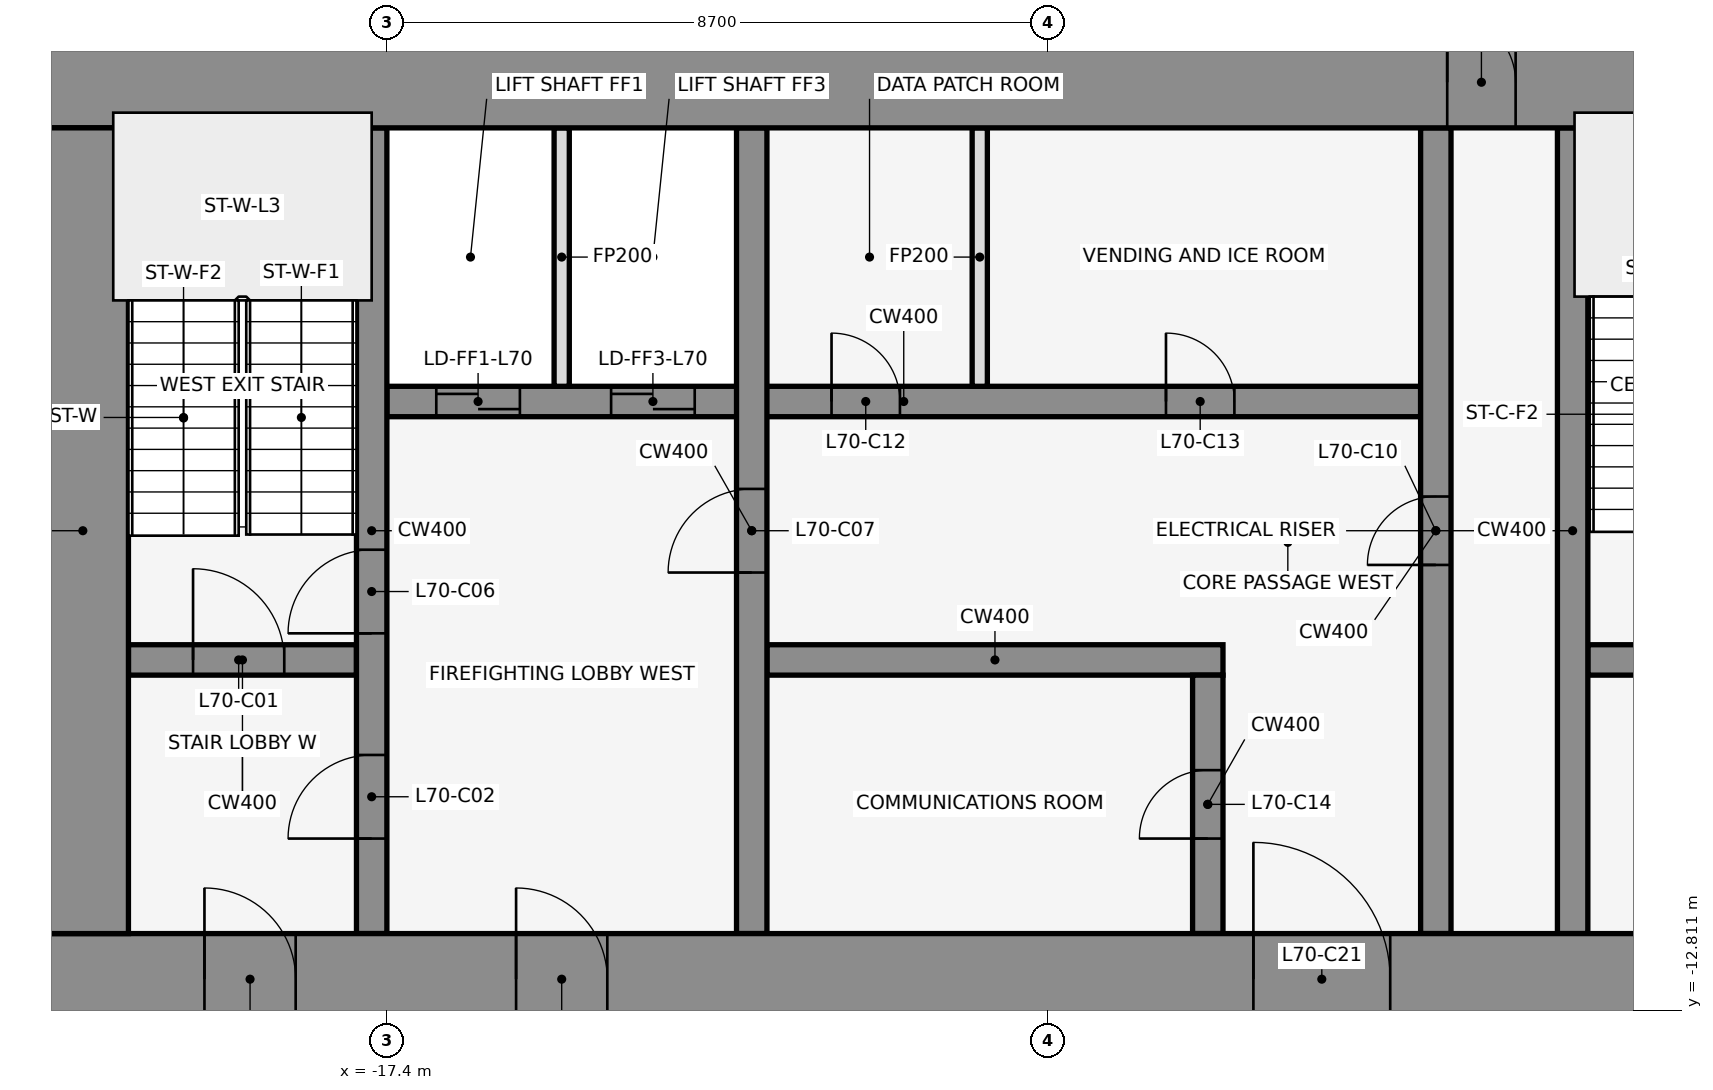
"""IFC4 building model, lengths in metres.
Left out: names, types, materials, properties, quantities, classifications, styles, units other than length and angle.
Written with IfcOpenShell. Run it as: python <this file> out.ifc"""

import sys

from ifc_helpers import new_model, si_unit, direction, frame, frame_2d, origin, place, context, subcontext, project, spatial, rectangle, extrude, element, fill, save


model = new_model("IFC4")
c1 = context("Model", 3, precision=1e-05, world=origin(), true_north=direction((0.0, 1.0)))
c2 = subcontext(c1, "Body", "Model", "MODEL_VIEW")
j1 = project(units=[si_unit("LENGTHUNIT", "METRE"), si_unit("PLANEANGLEUNIT", "RADIAN")], contexts=[c1])
p1 = place(None, origin())
s1 = spatial("IfcSite", under=j1, at=p1, CompositionType="ELEMENT")
p2 = place(p1, origin())
s2 = spatial("IfcBuilding", under=s1, at=p2, CompositionType="ELEMENT")
p3 = place(p2, frame((0.0, 0.0, 311.0)))
s3 = spatial("IfcBuildingStorey", under=s2, at=p3, CompositionType="ELEMENT", Elevation=311.0)
for number, where, z_axis, x_axis in (
    (1, (-0.068, -0.105, 0.0), (0.0, 0.0, 1.0), (-0.84, 0.543, 0.0)),
    (2, (-14.599, 1.08, 0.0), (0.0, 0.0, 1.0), (-0.84, -0.543, 0.0)),
):
    element("IfcWall", number, at=place(p3, frame(where, z_axis=z_axis, x_axis=x_axis)), inside=s3, PredefinedType="STANDARD", context=c2, shape_type="SweptSolid", body=[
        extrude(rectangle(XDim=2.183, YDim=0.25, at=frame_2d((1.091, 0.0))), origin(), (0.0, 0.0, 1.0), 4.35),
    ])
p4 = place(p3, frame((-20.8, -8.2, 0.0), z_axis=(0.0, 0.0, 1.0), x_axis=(1.0, 0.0, 0.0)))
e3 = element("IfcWall", 3, at=p4, inside=s3, PredefinedType="SHEAR", context=c2, shape_type="SweptSolid", body=[
    extrude(rectangle(XDim=3.0, YDim=0.4, at=frame_2d((1.5, 0.0))), origin(), (0.0, 0.0, 1.0), 4.5),
])
p5 = place(p4, frame((0.85, 0.0, 0.0)))
e4 = element("IfcOpeningElement", 4, at=p5, cuts=e3, PredefinedType="OPENING", context=c2, shape_type="SweptSolid", body=[
    extrude(rectangle(XDim=1.2, YDim=2.1, at=frame_2d((0.6, 1.05))), frame((0.0, 0.212, 0.0), z_axis=(0.0, -1.0, 0.0), x_axis=(1.0, 0.0, 0.0)), (0.0, 0.0, 1.0), 0.424),
])
p6 = place(p3, frame((-12.4, -8.2, 0.0), z_axis=(0.0, 0.0, 1.0), x_axis=(1.0, 0.0, 0.0)))
e5 = element("IfcWall", 5, at=p6, inside=s3, PredefinedType="SHEAR", context=c2, shape_type="SweptSolid", body=[
    extrude(rectangle(XDim=6.0, YDim=0.4, at=frame_2d((3.0, 0.0))), origin(), (0.0, 0.0, 1.0), 4.5),
])
p7 = place(p3, frame((-1.6, -8.2, 0.0), z_axis=(0.0, 0.0, 1.0), x_axis=(1.0, 0.0, 0.0)))
e6 = element("IfcWall", 6, at=p7, inside=s3, PredefinedType="SHEAR", context=c2, shape_type="SweptSolid", body=[
    extrude(rectangle(XDim=3.2, YDim=0.4, at=frame_2d((1.6, 0.0))), origin(), (0.0, 0.0, 1.0), 4.5),
])
p8 = place(p7, frame((1.05, 0.0, 0.0)))
e7 = element("IfcOpeningElement", 7, at=p8, cuts=e6, PredefinedType="OPENING", context=c2, shape_type="SweptSolid", body=[
    extrude(rectangle(XDim=1.2, YDim=2.1, at=frame_2d((0.6, 1.05))), frame((0.0, 0.212, 0.0), z_axis=(0.0, -1.0, 0.0), x_axis=(1.0, 0.0, 0.0)), (0.0, 0.0, 1.0), 0.424),
])
p9 = place(p3, frame((-17.4, -4.8, 0.0), z_axis=(0.0, 0.0, 1.0), x_axis=(1.0, 0.0, 0.0)))
e8 = element("IfcWall", 8, at=p9, inside=s3, PredefinedType="SHEAR", context=c2, shape_type="SweptSolid", body=[
    extrude(rectangle(XDim=13.6, YDim=0.4, at=frame_2d((6.8, 0.0))), origin(), (0.0, 0.0, 1.0), 4.5),
])
p10 = place(p9, frame((0.65, 0.0, 0.0)))
e9 = element("IfcOpeningElement", 9, at=p10, cuts=e8, PredefinedType="OPENING", context=c2, shape_type="SweptSolid", body=[
    extrude(rectangle(XDim=1.1, YDim=2.1, at=frame_2d((0.55, 1.05))), frame((0.0, 0.212, 0.0), z_axis=(0.0, -1.0, 0.0), x_axis=(1.0, 0.0, 0.0)), (0.0, 0.0, 1.0), 0.424),
])
p11 = place(p9, frame((2.95, 0.0, 0.0)))
e10 = element("IfcOpeningElement", 10, at=p11, cuts=e8, PredefinedType="OPENING", context=c2, shape_type="SweptSolid", body=[
    extrude(rectangle(XDim=1.1, YDim=2.1, at=frame_2d((0.55, 1.05))), frame((0.0, 0.212, 0.0), z_axis=(0.0, -1.0, 0.0), x_axis=(1.0, 0.0, 0.0)), (0.0, 0.0, 1.0), 0.424),
])
p12 = place(p9, frame((5.85, 0.0, 0.0)))
e11 = element("IfcOpeningElement", 11, at=p12, cuts=e8, PredefinedType="OPENING", context=c2, shape_type="SweptSolid", body=[
    extrude(rectangle(XDim=0.9, YDim=2.1, at=frame_2d((0.45, 1.05))), frame((0.0, 0.212, 0.0), z_axis=(0.0, -1.0, 0.0), x_axis=(1.0, 0.0, 0.0)), (0.0, 0.0, 1.0), 0.424),
])
p13 = place(p9, frame((10.25, 0.0, 0.0)))
e12 = element("IfcOpeningElement", 12, at=p13, cuts=e8, PredefinedType="OPENING", context=c2, shape_type="SweptSolid", body=[
    extrude(rectangle(XDim=0.9, YDim=2.1, at=frame_2d((0.45, 1.05))), frame((0.0, 0.212, 0.0), z_axis=(0.0, -1.0, 0.0), x_axis=(1.0, 0.0, 0.0)), (0.0, 0.0, 1.0), 0.424),
])
p14 = place(p3, frame((-17.6, -11.8, 0.0), z_axis=(0.0, 0.0, 1.0), x_axis=(0.0, 1.0, 0.0)))
e13 = element("IfcWall", 13, at=p14, inside=s3, PredefinedType="SHEAR", context=c2, shape_type="SweptSolid", body=[
    extrude(rectangle(XDim=10.6, YDim=0.4, at=frame_2d((5.3, 0.0))), origin(), (0.0, 0.0, 1.0), 4.5),
])
p15 = place(p14, frame((1.25, 0.0, 0.0)))
e14 = element("IfcOpeningElement", 14, at=p15, cuts=e13, PredefinedType="OPENING", context=c2, shape_type="SweptSolid", body=[
    extrude(rectangle(XDim=1.1, YDim=2.1, at=frame_2d((0.55, 1.05))), frame((0.0, 0.212, 0.0), z_axis=(0.0, -1.0, 0.0), x_axis=(1.0, 0.0, 0.0)), (0.0, 0.0, 1.0), 0.424),
])
p16 = place(p14, frame((3.95, 0.0, 0.0)))
e15 = element("IfcOpeningElement", 15, at=p16, cuts=e13, PredefinedType="OPENING", context=c2, shape_type="SweptSolid", body=[
    extrude(rectangle(XDim=1.1, YDim=2.1, at=frame_2d((0.55, 1.05))), frame((0.0, 0.212, 0.0), z_axis=(0.0, -1.0, 0.0), x_axis=(1.0, 0.0, 0.0)), (0.0, 0.0, 1.0), 0.424),
])
p17 = place(p3, frame((-15.1, -4.6, 0.0), z_axis=(0.0, 0.0, 1.0), x_axis=(0.0, 1.0, 0.0)))
e16 = element("IfcWall", 16, at=p17, inside=s3, PredefinedType="PARTITIONING", context=c2, shape_type="SweptSolid", body=[
    extrude(rectangle(XDim=3.4, YDim=0.2, at=frame_2d((1.7, 0.0))), origin(), (0.0, 0.0, 1.0), 3.418),
])
p18 = place(p3, frame((-12.6, -11.8, 0.0), z_axis=(0.0, 0.0, 1.0), x_axis=(0.0, 1.0, 0.0)))
e17 = element("IfcWall", 17, at=p18, inside=s3, PredefinedType="SHEAR", context=c2, shape_type="SweptSolid", body=[
    extrude(rectangle(XDim=10.6, YDim=0.4, at=frame_2d((5.3, 0.0))), origin(), (0.0, 0.0, 1.0), 4.5),
])
p19 = place(p18, frame((4.75, 0.0, 0.0)))
e18 = element("IfcOpeningElement", 18, at=p19, cuts=e17, PredefinedType="OPENING", context=c2, shape_type="SweptSolid", body=[
    extrude(rectangle(XDim=1.1, YDim=2.1, at=frame_2d((0.55, 1.05))), frame((0.0, 0.212, 0.0), z_axis=(0.0, -1.0, 0.0), x_axis=(1.0, 0.0, 0.0)), (0.0, 0.0, 1.0), 0.424),
])
p20 = place(p3, frame((-9.6, -4.6, 0.0), z_axis=(0.0, 0.0, 1.0), x_axis=(0.0, 1.0, 0.0)))
e19 = element("IfcWall", 19, at=p20, inside=s3, PredefinedType="PARTITIONING", context=c2, shape_type="SweptSolid", body=[
    extrude(rectangle(XDim=3.4, YDim=0.2, at=frame_2d((1.7, 0.0))), origin(), (0.0, 0.0, 1.0), 3.418),
])
p21 = place(p3, frame((-6.6, -11.8, 0.0), z_axis=(0.0, 0.0, 1.0), x_axis=(0.0, 1.0, 0.0)))
e20 = element("IfcWall", 20, at=p21, inside=s3, PredefinedType="SHEAR", context=c2, shape_type="SweptSolid", body=[
    extrude(rectangle(XDim=3.4, YDim=0.4, at=frame_2d((1.7, 0.0))), origin(), (0.0, 0.0, 1.0), 4.5),
])
p22 = place(p21, frame((1.25, 0.0, 0.0)))
e21 = element("IfcOpeningElement", 21, at=p22, cuts=e20, PredefinedType="OPENING", context=c2, shape_type="SweptSolid", body=[
    extrude(rectangle(XDim=0.9, YDim=2.1, at=frame_2d((0.45, 1.05))), frame((0.0, 0.212, 0.0), z_axis=(0.0, -1.0, 0.0), x_axis=(1.0, 0.0, 0.0)), (0.0, 0.0, 1.0), 0.424),
])
p23 = place(p3, frame((-3.6, -11.8, 0.0), z_axis=(0.0, 0.0, 1.0), x_axis=(0.0, 1.0, 0.0)))
e22 = element("IfcWall", 22, at=p23, inside=s3, PredefinedType="SHEAR", context=c2, shape_type="SweptSolid", body=[
    extrude(rectangle(XDim=10.6, YDim=0.4, at=frame_2d((5.3, 0.0))), origin(), (0.0, 0.0, 1.0), 4.5),
])
p24 = place(p23, frame((4.85, 0.0, 0.0)))
e23 = element("IfcOpeningElement", 23, at=p24, cuts=e22, PredefinedType="OPENING", context=c2, shape_type="SweptSolid", body=[
    extrude(rectangle(XDim=0.9, YDim=2.1, at=frame_2d((0.45, 1.05))), frame((0.0, 0.212, 0.0), z_axis=(0.0, -1.0, 0.0), x_axis=(1.0, 0.0, 0.0)), (0.0, 0.0, 1.0), 0.424),
])
p25 = place(p3, frame((-1.8, -11.8, 0.0), z_axis=(0.0, 0.0, 1.0), x_axis=(0.0, 1.0, 0.0)))
e24 = element("IfcWall", 24, at=p25, inside=s3, PredefinedType="SHEAR", context=c2, shape_type="SweptSolid", body=[
    extrude(rectangle(XDim=10.6, YDim=0.4, at=frame_2d((5.3, 0.0))), origin(), (0.0, 0.0, 1.0), 4.5),
])
p26 = place(p3, frame((-22.0, -0.6, 0.0), z_axis=(0.0, 0.0, 1.0), x_axis=(1.0, 0.0, 0.0)))
e25 = element("IfcWall", 25, at=p26, inside=s3, PredefinedType="SHEAR", context=c2, shape_type="SweptSolid", body=[
    extrude(rectangle(XDim=44.0, YDim=1.2, at=frame_2d((22.0, 0.0))), origin(), (0.0, 0.0, 1.0), 4.5),
])
p27 = place(p26, frame((18.55, 0.0, 0.0)))
e26 = element("IfcOpeningElement", 26, at=p27, cuts=e25, PredefinedType="OPENING", context=c2, shape_type="SweptSolid", body=[
    extrude(rectangle(XDim=0.9, YDim=2.1, at=frame_2d((0.45, 1.05))), frame((0.0, 0.612, 0.0), z_axis=(0.0, -1.0, 0.0), x_axis=(1.0, 0.0, 0.0)), (0.0, 0.0, 1.0), 1.224),
])
p28 = place(p26, frame((24.55, 0.0, 0.0)))
e27 = element("IfcOpeningElement", 27, at=p28, cuts=e25, PredefinedType="OPENING", context=c2, shape_type="SweptSolid", body=[
    extrude(rectangle(XDim=0.9, YDim=2.1, at=frame_2d((0.45, 1.05))), frame((0.0, 0.612, 0.0), z_axis=(0.0, -1.0, 0.0), x_axis=(1.0, 0.0, 0.0)), (0.0, 0.0, 1.0), 1.224),
])
p29 = place(p3, frame((-22.0, -12.4, 0.0), z_axis=(0.0, 0.0, 1.0), x_axis=(1.0, 0.0, 0.0)))
e28 = element("IfcWall", 28, at=p29, inside=s3, PredefinedType="SHEAR", context=c2, shape_type="SweptSolid", body=[
    extrude(rectangle(XDim=44.0, YDim=1.2, at=frame_2d((22.0, 0.0))), origin(), (0.0, 0.0, 1.0), 4.5),
])
p30 = place(p29, frame((2.2, 0.0, 0.0)))
e29 = element("IfcOpeningElement", 29, at=p30, cuts=e28, PredefinedType="OPENING", context=c2, shape_type="SweptSolid", body=[
    extrude(rectangle(XDim=1.2, YDim=2.1, at=frame_2d((0.6, 1.05))), frame((0.0, 0.612, 0.0), z_axis=(0.0, -1.0, 0.0), x_axis=(1.0, 0.0, 0.0)), (0.0, 0.0, 1.0), 1.224),
])
p31 = place(p29, frame((21.4, 0.0, 0.0)))
e30 = element("IfcOpeningElement", 30, at=p31, cuts=e28, PredefinedType="OPENING", context=c2, shape_type="SweptSolid", body=[
    extrude(rectangle(XDim=1.2, YDim=2.1, at=frame_2d((0.6, 1.05))), frame((0.0, 0.612, 0.0), z_axis=(0.0, -1.0, 0.0), x_axis=(1.0, 0.0, 0.0)), (0.0, 0.0, 1.0), 1.224),
])
p32 = place(p29, frame((40.6, 0.0, 0.0)))
e31 = element("IfcOpeningElement", 31, at=p32, cuts=e28, PredefinedType="OPENING", context=c2, shape_type="SweptSolid", body=[
    extrude(rectangle(XDim=1.2, YDim=2.1, at=frame_2d((0.6, 1.05))), frame((0.0, 0.612, 0.0), z_axis=(0.0, -1.0, 0.0), x_axis=(1.0, 0.0, 0.0)), (0.0, 0.0, 1.0), 1.224),
])
p33 = place(p29, frame((16.0, 0.0, 0.0)))
e32 = element("IfcOpeningElement", 32, at=p33, cuts=e28, PredefinedType="OPENING", context=c2, shape_type="SweptSolid", body=[
    extrude(rectangle(XDim=1.8, YDim=2.1, at=frame_2d((0.9, 1.05))), frame((0.0, 0.612, 0.0), z_axis=(0.0, -1.0, 0.0), x_axis=(1.0, 0.0, 0.0)), (0.0, 0.0, 1.0), 1.224),
])
p34 = place(p29, frame((6.3, 0.0, 0.0)))
e33 = element("IfcOpeningElement", 33, at=p34, cuts=e28, PredefinedType="OPENING", context=c2, shape_type="SweptSolid", body=[
    extrude(rectangle(XDim=1.2, YDim=2.1, at=frame_2d((0.6, 1.05))), frame((0.0, 0.612, 0.0), z_axis=(0.0, -1.0, 0.0), x_axis=(1.0, 0.0, 0.0)), (0.0, 0.0, 1.0), 1.224),
])
p35 = place(p29, frame((26.2, 0.0, 0.0)))
e34 = element("IfcOpeningElement", 34, at=p35, cuts=e28, PredefinedType="OPENING", context=c2, shape_type="SweptSolid", body=[
    extrude(rectangle(XDim=1.8, YDim=2.1, at=frame_2d((0.9, 1.05))), frame((0.0, 0.612, 0.0), z_axis=(0.0, -1.0, 0.0), x_axis=(1.0, 0.0, 0.0)), (0.0, 0.0, 1.0), 1.224),
])
p36 = place(p29, frame((36.5, 0.0, 0.0)))
e35 = element("IfcOpeningElement", 35, at=p36, cuts=e28, PredefinedType="OPENING", context=c2, shape_type="SweptSolid", body=[
    extrude(rectangle(XDim=1.2, YDim=2.1, at=frame_2d((0.6, 1.05))), frame((0.0, 0.612, 0.0), z_axis=(0.0, -1.0, 0.0), x_axis=(1.0, 0.0, 0.0)), (0.0, 0.0, 1.0), 1.224),
])
p37 = place(p3, frame((-21.4, -11.8, 0.0), z_axis=(0.0, 0.0, 1.0), x_axis=(0.0, 1.0, 0.0)))
e36 = element("IfcWall", 36, at=p37, inside=s3, PredefinedType="SHEAR", context=c2, shape_type="SweptSolid", body=[
    extrude(rectangle(XDim=10.6, YDim=1.2, at=frame_2d((5.3, 0.0))), origin(), (0.0, 0.0, 1.0), 4.5),
])
p38 = place(p5, origin())
e37 = element("IfcDoor", 37, at=p38, inside=s3, OperationType="SINGLE_SWING_LEFT", PredefinedType="DOOR", context=c2, shape_type="SweptSolid", body=[
    extrude(rectangle(XDim=1.2, YDim=2.1, at=frame_2d((0.6, 1.05))), frame((0.0, 0.025, 0.0), z_axis=(0.0, -1.0, 0.0), x_axis=(1.0, 0.0, 0.0)), (0.0, 0.0, 1.0), 0.05),
])
fill(e4, e37)
p39 = place(p15, frame((1.1, 0.0, 0.0), z_axis=(0.0, 0.0, 1.0), x_axis=(-1.0, 0.0, 0.0)))
e38 = element("IfcDoor", 38, at=p39, inside=s3, OperationType="SINGLE_SWING_LEFT", PredefinedType="DOOR", context=c2, shape_type="SweptSolid", body=[
    extrude(rectangle(XDim=1.1, YDim=2.1, at=frame_2d((0.55, 1.05))), frame((0.0, 0.025, 0.0), z_axis=(0.0, -1.0, 0.0), x_axis=(1.0, 0.0, 0.0)), (0.0, 0.0, 1.0), 0.05),
])
fill(e14, e38)
p40 = place(p10, origin())
e39 = element("IfcDoor", 39, at=p40, inside=s3, OperationType="DOUBLE_DOOR_SLIDING", PredefinedType="DOOR", context=c2, shape_type="SweptSolid", body=[
    extrude(rectangle(XDim=1.1, YDim=2.1, at=frame_2d((0.55, 1.05))), frame((0.0, 0.025, 0.0), z_axis=(0.0, -1.0, 0.0), x_axis=(1.0, 0.0, 0.0)), (0.0, 0.0, 1.0), 0.05),
])
fill(e9, e39)
p41 = place(p11, origin())
e40 = element("IfcDoor", 40, at=p41, inside=s3, OperationType="DOUBLE_DOOR_SLIDING", PredefinedType="DOOR", context=c2, shape_type="SweptSolid", body=[
    extrude(rectangle(XDim=1.1, YDim=2.1, at=frame_2d((0.55, 1.05))), frame((0.0, 0.025, 0.0), z_axis=(0.0, -1.0, 0.0), x_axis=(1.0, 0.0, 0.0)), (0.0, 0.0, 1.0), 0.05),
])
fill(e10, e40)
p42 = place(p16, frame((1.1, 0.0, 0.0), z_axis=(0.0, 0.0, 1.0), x_axis=(-1.0, 0.0, 0.0)))
e41 = element("IfcDoor", 41, at=p42, inside=s3, OperationType="SINGLE_SWING_LEFT", PredefinedType="DOOR", context=c2, shape_type="SweptSolid", body=[
    extrude(rectangle(XDim=1.1, YDim=2.1, at=frame_2d((0.55, 1.05))), frame((0.0, 0.025, 0.0), z_axis=(0.0, -1.0, 0.0), x_axis=(1.0, 0.0, 0.0)), (0.0, 0.0, 1.0), 0.05),
])
fill(e15, e41)
p43 = place(p19, origin())
e42 = element("IfcDoor", 42, at=p43, inside=s3, OperationType="SINGLE_SWING_LEFT", PredefinedType="DOOR", context=c2, shape_type="SweptSolid", body=[
    extrude(rectangle(XDim=1.1, YDim=2.1, at=frame_2d((0.55, 1.05))), frame((0.0, 0.025, 0.0), z_axis=(0.0, -1.0, 0.0), x_axis=(1.0, 0.0, 0.0)), (0.0, 0.0, 1.0), 0.05),
])
fill(e18, e42)
p44 = place(p24, frame((0.9, 0.0, 0.0), z_axis=(0.0, 0.0, 1.0), x_axis=(-1.0, 0.0, 0.0)))
e43 = element("IfcDoor", 43, at=p44, inside=s3, OperationType="SINGLE_SWING_LEFT", PredefinedType="DOOR", context=c2, shape_type="SweptSolid", body=[
    extrude(rectangle(XDim=0.9, YDim=2.1, at=frame_2d((0.45, 1.05))), frame((0.0, 0.025, 0.0), z_axis=(0.0, -1.0, 0.0), x_axis=(1.0, 0.0, 0.0)), (0.0, 0.0, 1.0), 0.05),
])
fill(e23, e43)
p45 = place(p12, origin())
e44 = element("IfcDoor", 44, at=p45, inside=s3, OperationType="SINGLE_SWING_RIGHT", PredefinedType="DOOR", context=c2, shape_type="SweptSolid", body=[
    extrude(rectangle(XDim=0.9, YDim=2.1, at=frame_2d((0.45, 1.05))), frame((0.0, 0.025, 0.0), z_axis=(0.0, -1.0, 0.0), x_axis=(1.0, 0.0, 0.0)), (0.0, 0.0, 1.0), 0.05),
])
fill(e11, e44)
p46 = place(p13, origin())
e45 = element("IfcDoor", 45, at=p46, inside=s3, OperationType="SINGLE_SWING_LEFT", PredefinedType="DOOR", context=c2, shape_type="SweptSolid", body=[
    extrude(rectangle(XDim=0.9, YDim=2.1, at=frame_2d((0.45, 1.05))), frame((0.0, 0.025, 0.0), z_axis=(0.0, -1.0, 0.0), x_axis=(1.0, 0.0, 0.0)), (0.0, 0.0, 1.0), 0.05),
])
fill(e12, e45)
p47 = place(p22, origin())
e46 = element("IfcDoor", 46, at=p47, inside=s3, OperationType="SINGLE_SWING_RIGHT", PredefinedType="DOOR", context=c2, shape_type="SweptSolid", body=[
    extrude(rectangle(XDim=0.9, YDim=2.1, at=frame_2d((0.45, 1.05))), frame((0.0, 0.025, 0.0), z_axis=(0.0, -1.0, 0.0), x_axis=(1.0, 0.0, 0.0)), (0.0, 0.0, 1.0), 0.05),
])
fill(e21, e46)
p48 = place(p27, origin())
e47 = element("IfcDoor", 47, at=p48, inside=s3, OperationType="SINGLE_SWING_LEFT", PredefinedType="DOOR", context=c2, shape_type="SweptSolid", body=[
    extrude(rectangle(XDim=0.9, YDim=2.1, at=frame_2d((0.45, 1.05))), frame((0.0, 0.025, 0.0), z_axis=(0.0, -1.0, 0.0), x_axis=(1.0, 0.0, 0.0)), (0.0, 0.0, 1.0), 0.05),
])
fill(e26, e47)
p49 = place(p30, frame((1.2, 0.0, 0.0), z_axis=(0.0, 0.0, 1.0), x_axis=(-1.0, 0.0, 0.0)))
e48 = element("IfcDoor", 48, at=p49, inside=s3, OperationType="SINGLE_SWING_RIGHT", PredefinedType="DOOR", context=c2, shape_type="SweptSolid", body=[
    extrude(rectangle(XDim=1.2, YDim=2.1, at=frame_2d((0.6, 1.05))), frame((0.0, 0.025, 0.0), z_axis=(0.0, -1.0, 0.0), x_axis=(1.0, 0.0, 0.0)), (0.0, 0.0, 1.0), 0.05),
])
fill(e29, e48)
p50 = place(p33, origin())
e49 = element("IfcDoor", 49, at=p50, inside=s3, OperationType="SINGLE_SWING_LEFT", PredefinedType="DOOR", context=c2, shape_type="SweptSolid", body=[
    extrude(rectangle(XDim=1.8, YDim=2.1, at=frame_2d((0.9, 1.05))), frame((0.0, 0.025, 0.0), z_axis=(0.0, -1.0, 0.0), x_axis=(1.0, 0.0, 0.0)), (0.0, 0.0, 1.0), 0.05),
])
fill(e32, e49)
p51 = place(p34, frame((1.2, 0.0, 0.0), z_axis=(0.0, 0.0, 1.0), x_axis=(-1.0, 0.0, 0.0)))
e50 = element("IfcDoor", 50, at=p51, inside=s3, OperationType="SINGLE_SWING_RIGHT", PredefinedType="DOOR", context=c2, shape_type="SweptSolid", body=[
    extrude(rectangle(XDim=1.2, YDim=2.1, at=frame_2d((0.6, 1.05))), frame((0.0, 0.025, 0.0), z_axis=(0.0, -1.0, 0.0), x_axis=(1.0, 0.0, 0.0)), (0.0, 0.0, 1.0), 0.05),
])
fill(e33, e50)
save(model, sys.argv[1])
